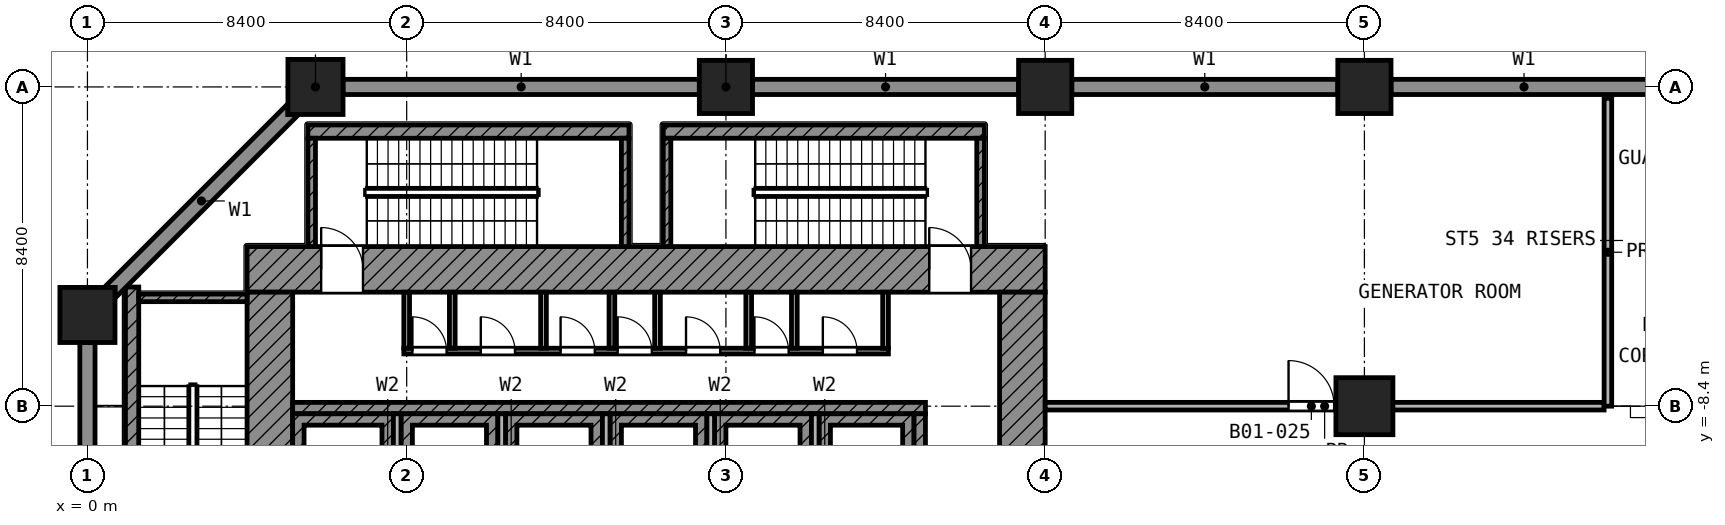
"""IFC4 building model, lengths in metres.
Left out: names, types, materials, properties, quantities, classifications, styles, units other than length and angle.
Written with IfcOpenShell. Run it as: python <this file> out.ifc"""

import sys

from ifc_helpers import new_model, si_unit, direction, frame, frame_2d, origin, origin_2d, place, context, subcontext, project, spatial, polyline, rectangle, outline, extrude, element, fill, save


model = new_model("IFC4")
c1 = context("Model", 3, precision=1e-05, world=origin(), true_north=direction((0.0, 1.0)))
c2 = subcontext(c1, "Body", "Model", "MODEL_VIEW")
j1 = project(units=[si_unit("LENGTHUNIT", "METRE"), si_unit("PLANEANGLEUNIT", "RADIAN")], contexts=[c1])
p1 = place(None, origin())
s1 = spatial("IfcSite", under=j1, at=p1, CompositionType="ELEMENT")
p2 = place(p1, origin())
s2 = spatial("IfcBuilding", under=s1, at=p2, CompositionType="ELEMENT")
p3 = place(p2, frame((0.0, 0.0, -6.0)))
s3 = spatial("IfcBuildingStorey", under=s2, at=p3, CompositionType="ELEMENT", Elevation=-6.0)
p4 = place(p3, origin())
e1 = element("IfcWall", 1, at=p4, inside=s3, PredefinedType="SOLIDWALL", context=c2, shape_type="SweptSolid", body=[
    extrude(outline(polyline([(16.1, -0.2), (6.725, -0.2), (6.725, 0.2), (16.1, 0.2), (16.1, -0.2)])), origin(), (0.0, 0.0, 1.0), 5.55),
])
e2 = element("IfcWall", 2, at=p4, inside=s3, PredefinedType="SOLIDWALL", context=c2, shape_type="SweptSolid", body=[
    extrude(outline(polyline([(24.5, -0.2), (17.5, -0.2), (17.5, 0.2), (24.5, 0.2), (24.5, -0.2)])), origin(), (0.0, 0.0, 1.0), 5.55),
])
e3 = element("IfcWall", 3, at=p4, inside=s3, PredefinedType="SOLIDWALL", context=c2, shape_type="SweptSolid", body=[
    extrude(outline(polyline([(32.9, -0.2), (25.9, -0.2), (25.9, 0.2), (32.9, 0.2), (32.9, -0.2)])), origin(), (0.0, 0.0, 1.0), 5.55),
])
e4 = element("IfcWall", 4, at=p4, inside=s3, PredefinedType="SOLIDWALL", context=c2, shape_type="SweptSolid", body=[
    extrude(outline(polyline([(41.3, -0.2), (34.3, -0.2), (34.3, 0.2), (41.3, 0.2), (41.3, -0.2)])), origin(), (0.0, 0.0, 1.0), 5.55),
])
e5 = element("IfcWall", 5, at=p4, inside=s3, PredefinedType="SOLIDWALL", context=c2, shape_type="SweptSolid", body=[
    extrude(outline(polyline([(5.275, -0.725), (5.558, -0.725), (0.725, -5.558), (0.725, -5.275), (0.442, -5.275), (5.275, -0.442), (5.275, -0.725)])), origin(), (0.0, 0.0, 1.0), 5.55),
])
e6 = element("IfcWall", 6, at=p4, inside=s3, PredefinedType="SOLIDWALL", context=c2, shape_type="SweptSolid", body=[
    extrude(outline(polyline([(0.2, -6.725), (0.2, -16.1), (-0.2, -16.1), (-0.2, -6.725), (0.2, -6.725)])), origin(), (0.0, 0.0, 1.0), 5.55),
])
e7 = element("IfcWall", 7, at=p4, inside=s3, PredefinedType="SHEAR", context=c2, shape_type="SweptSolid", body=[
    extrude(outline(polyline([(5.4, -10.95), (5.4, -8.6), (8.05, -8.6), (8.05, -10.95), (5.4, -10.95)]), holes=[polyline([(7.75, -8.9), (5.7, -8.9), (5.7, -10.65), (7.75, -10.65), (7.75, -8.9)])]), origin(), (0.0, 0.0, 1.0), 4.2),
])
e8 = element("IfcWall", 8, at=p4, inside=s3, PredefinedType="SHEAR", context=c2, shape_type="SweptSolid", body=[
    extrude(outline(polyline([(8.25, -10.95), (8.25, -8.6), (10.8, -8.6), (10.8, -10.95), (8.25, -10.95)]), holes=[polyline([(10.5, -8.9), (8.55, -8.9), (8.55, -10.65), (10.5, -10.65), (10.5, -8.9)])]), origin(), (0.0, 0.0, 1.0), 4.2),
])
e9 = element("IfcWall", 9, at=p4, inside=s3, PredefinedType="SHEAR", context=c2, shape_type="SweptSolid", body=[
    extrude(outline(polyline([(11.0, -10.95), (11.0, -8.6), (13.55, -8.6), (13.55, -10.95), (11.0, -10.95)]), holes=[polyline([(13.25, -8.9), (11.3, -8.9), (11.3, -10.65), (13.25, -10.65), (13.25, -8.9)])]), origin(), (0.0, 0.0, 1.0), 4.2),
])
e10 = element("IfcWall", 10, at=p4, inside=s3, PredefinedType="SHEAR", context=c2, shape_type="SweptSolid", body=[
    extrude(outline(polyline([(13.75, -10.95), (13.75, -8.6), (16.3, -8.6), (16.3, -10.95), (13.75, -10.95)]), holes=[polyline([(16.0, -8.9), (14.05, -8.9), (14.05, -10.65), (16.0, -10.65), (16.0, -8.9)])]), origin(), (0.0, 0.0, 1.0), 4.2),
])
e11 = element("IfcWall", 11, at=p4, inside=s3, PredefinedType="SHEAR", context=c2, shape_type="SweptSolid", body=[
    extrude(outline(polyline([(16.5, -10.95), (16.5, -8.6), (19.05, -8.6), (19.05, -10.95), (16.5, -10.95)]), holes=[polyline([(18.75, -8.9), (16.8, -8.9), (16.8, -10.65), (18.75, -10.65), (18.75, -8.9)])]), origin(), (0.0, 0.0, 1.0), 4.2),
])
e12 = element("IfcWall", 12, at=p4, inside=s3, PredefinedType="SHEAR", context=c2, shape_type="SweptSolid", body=[
    extrude(outline(polyline([(19.25, -10.95), (19.25, -8.6), (21.75, -8.6), (21.75, -10.95), (19.25, -10.95)]), holes=[polyline([(21.45, -8.9), (19.55, -8.9), (19.55, -10.65), (21.45, -10.65), (21.45, -8.9)])]), origin(), (0.0, 0.0, 1.0), 4.2),
])
p5 = place(p3, frame((6.0, 0.0, 0.0), z_axis=(0.0, 0.0, 1.0), x_axis=(1.0, 0.0, 0.0)))
e13 = element("IfcColumn", 13, at=p5, inside=s3, PredefinedType="COLUMN", context=c2, shape_type="SweptSolid", body=[
    extrude(rectangle(XDim=1.45, YDim=1.45, at=origin_2d()), origin(), (0.0, 0.0, 1.0), 6.0),
])
for number, where, z_axis, x_axis in (
    (14, (16.8, 0.0, 0.0), (0.0, 0.0, 1.0), (1.0, 0.0, 0.0)),
    (15, (25.2, 0.0, 0.0), (0.0, 0.0, 1.0), (1.0, 0.0, 0.0)),
    (16, (33.6, 0.0, 0.0), (0.0, 0.0, 1.0), (1.0, 0.0, 0.0)),
):
    element("IfcColumn", number, at=place(p3, frame(where, z_axis=z_axis, x_axis=x_axis)), inside=s3, PredefinedType="COLUMN", context=c2, shape_type="SweptSolid", body=[
        extrude(rectangle(XDim=1.4, YDim=1.4, at=origin_2d()), origin(), (0.0, 0.0, 1.0), 6.0),
    ])
p6 = place(p3, frame((0.0, -6.0, 0.0), z_axis=(0.0, 0.0, 1.0), x_axis=(1.0, 0.0, 0.0)))
e17 = element("IfcColumn", 17, at=p6, inside=s3, PredefinedType="COLUMN", context=c2, shape_type="SweptSolid", body=[
    extrude(rectangle(XDim=1.45, YDim=1.45, at=origin_2d()), origin(), (0.0, 0.0, 1.0), 6.0),
])
p7 = place(p3, frame((33.6, -8.4, 0.0), z_axis=(0.0, 0.0, 1.0), x_axis=(1.0, 0.0, 0.0)))
e18 = element("IfcColumn", 18, at=p7, inside=s3, PredefinedType="COLUMN", context=c2, shape_type="SweptSolid", body=[
    extrude(rectangle(XDim=1.5, YDim=1.5, at=origin_2d()), origin(), (0.0, 0.0, 1.0), 6.0),
])
p8 = place(p3, frame((4.2, -4.8, 0.0), z_axis=(0.0, 0.0, 1.0), x_axis=(1.0, 0.0, 0.0)))
e19 = element("IfcWall", 19, at=p8, inside=s3, PredefinedType="SHEAR", context=c2, shape_type="SweptSolid", body=[
    extrude(rectangle(XDim=21.0, YDim=1.2, at=frame_2d((10.5, 0.0))), origin(), (0.0, 0.0, 1.0), 5.55),
])
p9 = place(p8, frame((1.95, 0.0, 0.0)))
e20 = element("IfcOpeningElement", 20, at=p9, cuts=e19, PredefinedType="OPENING", context=c2, shape_type="SweptSolid", body=[
    extrude(rectangle(XDim=1.1, YDim=2.1, at=frame_2d((0.55, 1.05))), frame((0.0, 0.61, 0.0), z_axis=(0.0, -1.0, 0.0), x_axis=(1.0, 0.0, 0.0)), (0.0, 0.0, 1.0), 1.22),
])
p10 = place(p8, frame((17.95, 0.0, 0.0)))
e21 = element("IfcOpeningElement", 21, at=p10, cuts=e19, PredefinedType="OPENING", context=c2, shape_type="SweptSolid", body=[
    extrude(rectangle(XDim=1.1, YDim=2.1, at=frame_2d((0.55, 1.05))), frame((0.0, 0.61, 0.0), z_axis=(0.0, -1.0, 0.0), x_axis=(1.0, 0.0, 0.0)), (0.0, 0.0, 1.0), 1.22),
])
p11 = place(p3, frame((4.8, -25.2, 0.0), z_axis=(0.0, 0.0, 1.0), x_axis=(0.0, 1.0, 0.0)))
e22 = element("IfcWall", 22, at=p11, inside=s3, PredefinedType="SHEAR", context=c2, shape_type="SweptSolid", body=[
    extrude(rectangle(XDim=19.8, YDim=1.2, at=frame_2d((9.9, 0.0))), origin(), (0.0, 0.0, 1.0), 5.55),
])
p12 = place(p11, frame((11.65, 0.0, 0.0)))
e23 = element("IfcOpeningElement", 23, at=p12, cuts=e22, PredefinedType="OPENING", context=c2, shape_type="SweptSolid", body=[
    extrude(rectangle(XDim=1.1, YDim=2.1, at=frame_2d((0.55, 1.05))), frame((0.0, 0.61, 0.0), z_axis=(0.0, -1.0, 0.0), x_axis=(1.0, 0.0, 0.0)), (0.0, 0.0, 1.0), 1.22),
])
p13 = place(p11, frame((2.35, 0.0, 0.0)))
e24 = element("IfcOpeningElement", 24, at=p13, cuts=e22, PredefinedType="OPENING", context=c2, shape_type="SweptSolid", body=[
    extrude(rectangle(XDim=1.1, YDim=2.1, at=frame_2d((0.55, 1.05))), frame((0.0, 0.61, 0.0), z_axis=(0.0, -1.0, 0.0), x_axis=(1.0, 0.0, 0.0)), (0.0, 0.0, 1.0), 1.22),
])
p14 = place(p3, frame((24.6, -24.0, 0.0), z_axis=(0.0, 0.0, 1.0), x_axis=(0.0, 1.0, 0.0)))
e25 = element("IfcWall", 25, at=p14, inside=s3, PredefinedType="SHEAR", context=c2, shape_type="SweptSolid", body=[
    extrude(rectangle(XDim=18.6, YDim=1.2, at=frame_2d((9.3, 0.0))), origin(), (0.0, 0.0, 1.0), 5.55),
])
p15 = place(p14, frame((10.5, 0.0, 0.0)))
e26 = element("IfcOpeningElement", 26, at=p15, cuts=e25, PredefinedType="OPENING", context=c2, shape_type="SweptSolid", body=[
    extrude(rectangle(XDim=1.8, YDim=2.1, at=frame_2d((0.9, 1.05))), frame((0.0, 0.61, 0.0), z_axis=(0.0, -1.0, 0.0), x_axis=(1.0, 0.0, 0.0)), (0.0, 0.0, 1.0), 1.22),
])
p16 = place(p3, frame((5.4, -8.45, 0.0), z_axis=(0.0, 0.0, 1.0), x_axis=(1.0, 0.0, 0.0)))
e27 = element("IfcWall", 27, at=p16, inside=s3, PredefinedType="SHEAR", context=c2, shape_type="SweptSolid", body=[
    extrude(rectangle(XDim=16.65, YDim=0.3, at=frame_2d((8.325, 0.0))), origin(), (0.0, 0.0, 1.0), 5.55),
])
p17 = place(p3, frame((21.9, -10.95, 0.0), z_axis=(0.0, 0.0, 1.0), x_axis=(0.0, 1.0, 0.0)))
e28 = element("IfcWall", 28, at=p17, inside=s3, PredefinedType="SHEAR", context=c2, shape_type="SweptSolid", body=[
    extrude(rectangle(XDim=2.35, YDim=0.3, at=frame_2d((1.175, 0.0))), origin(), (0.0, 0.0, 1.0), 5.55),
])
for number, where, z_axis, x_axis in (
    (29, (8.15, -10.95, 0.0), (0.0, 0.0, 1.0), (0.0, 1.0, 0.0)),
    (30, (10.9, -10.95, 0.0), (0.0, 0.0, 1.0), (0.0, 1.0, 0.0)),
    (31, (13.65, -10.95, 0.0), (0.0, 0.0, 1.0), (0.0, 1.0, 0.0)),
    (32, (16.4, -10.95, 0.0), (0.0, 0.0, 1.0), (0.0, 1.0, 0.0)),
    (33, (19.15, -10.95, 0.0), (0.0, 0.0, 1.0), (0.0, 1.0, 0.0)),
):
    element("IfcWall", number, at=place(p3, frame(where, z_axis=z_axis, x_axis=x_axis)), inside=s3, PredefinedType="PARTITIONING", context=c2, shape_type="SweptSolid", body=[
        extrude(rectangle(XDim=2.35, YDim=0.2, at=frame_2d((1.175, 0.0))), origin(), (0.0, 0.0, 1.0), 5.55),
    ])
p18 = place(p3, frame((8.325, -6.95, 0.0), z_axis=(0.0, 0.0, 1.0), x_axis=(1.0, 0.0, 0.0)))
e34 = element("IfcWall", 34, at=p18, inside=s3, PredefinedType="PARTITIONING", context=c2, shape_type="SweptSolid", body=[
    extrude(rectangle(XDim=12.75, YDim=0.15, at=frame_2d((6.375, 0.0))), origin(), (0.0, 0.0, 1.0), 5.55),
])
p19 = place(p18, frame((0.225, 0.0, 0.0)))
e35 = element("IfcOpeningElement", 35, at=p19, cuts=e34, PredefinedType="OPENING", context=c2, shape_type="SweptSolid", body=[
    extrude(rectangle(XDim=0.9, YDim=2.1, at=frame_2d((0.45, 1.05))), frame((0.0, 0.085, 0.0), z_axis=(0.0, -1.0, 0.0), x_axis=(1.0, 0.0, 0.0)), (0.0, 0.0, 1.0), 0.17),
])
p20 = place(p18, frame((2.025, 0.0, 0.0)))
e36 = element("IfcOpeningElement", 36, at=p20, cuts=e34, PredefinedType="OPENING", context=c2, shape_type="SweptSolid", body=[
    extrude(rectangle(XDim=0.9, YDim=2.1, at=frame_2d((0.45, 1.05))), frame((0.0, 0.085, 0.0), z_axis=(0.0, -1.0, 0.0), x_axis=(1.0, 0.0, 0.0)), (0.0, 0.0, 1.0), 0.17),
])
p21 = place(p18, frame((4.125, 0.0, 0.0)))
e37 = element("IfcOpeningElement", 37, at=p21, cuts=e34, PredefinedType="OPENING", context=c2, shape_type="SweptSolid", body=[
    extrude(rectangle(XDim=0.9, YDim=2.1, at=frame_2d((0.45, 1.05))), frame((0.0, 0.085, 0.0), z_axis=(0.0, -1.0, 0.0), x_axis=(1.0, 0.0, 0.0)), (0.0, 0.0, 1.0), 0.17),
])
p22 = place(p18, frame((5.625, 0.0, 0.0)))
e38 = element("IfcOpeningElement", 38, at=p22, cuts=e34, PredefinedType="OPENING", context=c2, shape_type="SweptSolid", body=[
    extrude(rectangle(XDim=0.9, YDim=2.1, at=frame_2d((0.45, 1.05))), frame((0.0, 0.085, 0.0), z_axis=(0.0, -1.0, 0.0), x_axis=(1.0, 0.0, 0.0)), (0.0, 0.0, 1.0), 0.17),
])
p23 = place(p18, frame((7.425, 0.0, 0.0)))
e39 = element("IfcOpeningElement", 39, at=p23, cuts=e34, PredefinedType="OPENING", context=c2, shape_type="SweptSolid", body=[
    extrude(rectangle(XDim=0.9, YDim=2.1, at=frame_2d((0.45, 1.05))), frame((0.0, 0.085, 0.0), z_axis=(0.0, -1.0, 0.0), x_axis=(1.0, 0.0, 0.0)), (0.0, 0.0, 1.0), 0.17),
])
p24 = place(p18, frame((9.225, 0.0, 0.0)))
e40 = element("IfcOpeningElement", 40, at=p24, cuts=e34, PredefinedType="OPENING", context=c2, shape_type="SweptSolid", body=[
    extrude(rectangle(XDim=0.9, YDim=2.1, at=frame_2d((0.45, 1.05))), frame((0.0, 0.085, 0.0), z_axis=(0.0, -1.0, 0.0), x_axis=(1.0, 0.0, 0.0)), (0.0, 0.0, 1.0), 0.17),
])
p25 = place(p18, frame((11.025, 0.0, 0.0)))
e41 = element("IfcOpeningElement", 41, at=p25, cuts=e34, PredefinedType="OPENING", context=c2, shape_type="SweptSolid", body=[
    extrude(rectangle(XDim=0.9, YDim=2.1, at=frame_2d((0.45, 1.05))), frame((0.0, 0.085, 0.0), z_axis=(0.0, -1.0, 0.0), x_axis=(1.0, 0.0, 0.0)), (0.0, 0.0, 1.0), 0.17),
])
for number, where, z_axis, x_axis in (
    (42, (8.4, -6.875, 0.0), (0.0, 0.0, 1.0), (0.0, 1.0, 0.0)),
    (43, (9.6, -6.875, 0.0), (0.0, 0.0, 1.0), (0.0, 1.0, 0.0)),
    (44, (12.0, -6.875, 0.0), (0.0, 0.0, 1.0), (0.0, 1.0, 0.0)),
    (45, (13.8, -6.875, 0.0), (0.0, 0.0, 1.0), (0.0, 1.0, 0.0)),
    (46, (15.0, -6.875, 0.0), (0.0, 0.0, 1.0), (0.0, 1.0, 0.0)),
    (47, (17.4, -6.875, 0.0), (0.0, 0.0, 1.0), (0.0, 1.0, 0.0)),
    (48, (18.6, -6.875, 0.0), (0.0, 0.0, 1.0), (0.0, 1.0, 0.0)),
    (49, (21.0, -6.875, 0.0), (0.0, 0.0, 1.0), (0.0, 1.0, 0.0)),
):
    element("IfcWall", number, at=place(p3, frame(where, z_axis=z_axis, x_axis=x_axis)), inside=s3, PredefinedType="PARTITIONING", context=c2, shape_type="SweptSolid", body=[
        extrude(rectangle(XDim=1.475, YDim=0.15, at=frame_2d((0.738, 0.0))), origin(), (0.0, 0.0, 1.0), 5.55),
    ])
p26 = place(p3, frame((1.175, -13.9, 0.0), z_axis=(0.0, 0.0, 1.0), x_axis=(0.0, 1.0, 0.0)))
e50 = element("IfcWall", 50, at=p26, inside=s3, PredefinedType="SHEAR", context=c2, shape_type="SweptSolid", body=[
    extrude(rectangle(XDim=8.635, YDim=0.35, at=frame_2d((4.317, 0.0))), origin(), (0.0, 0.0, 1.0), 5.55),
])
p27 = place(p3, frame((1.35, -5.55, 0.0), z_axis=(0.0, 0.0, 1.0), x_axis=(1.0, 0.0, 0.0)))
e51 = element("IfcWall", 51, at=p27, inside=s3, PredefinedType="SHEAR", context=c2, shape_type="SweptSolid", body=[
    extrude(rectangle(XDim=2.85, YDim=0.2, at=frame_2d((1.425, 0.0))), origin(), (0.0, 0.0, 1.0), 5.55),
])
p28 = place(p3, frame((5.8, -1.175, 0.0), z_axis=(0.0, 0.0, 1.0), x_axis=(1.0, 0.0, 0.0)))
e52 = element("IfcWall", 52, at=p28, inside=s3, PredefinedType="SHEAR", context=c2, shape_type="SweptSolid", body=[
    extrude(rectangle(XDim=8.45, YDim=0.35, at=frame_2d((4.225, 0.0))), origin(), (0.0, 0.0, 1.0), 5.55),
])
for number, where, z_axis, x_axis in (
    (53, (5.9, -4.2, 0.0), (0.0, 0.0, 1.0), (0.0, 1.0, 0.0)),
    (54, (14.15, -4.2, 0.0), (0.0, 0.0, 1.0), (0.0, 1.0, 0.0)),
):
    element("IfcWall", number, at=place(p3, frame(where, z_axis=z_axis, x_axis=x_axis)), inside=s3, PredefinedType="SHEAR", context=c2, shape_type="SweptSolid", body=[
        extrude(rectangle(XDim=2.85, YDim=0.2, at=frame_2d((1.425, 0.0))), origin(), (0.0, 0.0, 1.0), 5.55),
    ])
p29 = place(p3, frame((15.15, -1.175, 0.0), z_axis=(0.0, 0.0, 1.0), x_axis=(1.0, 0.0, 0.0)))
e55 = element("IfcWall", 55, at=p29, inside=s3, PredefinedType="SHEAR", context=c2, shape_type="SweptSolid", body=[
    extrude(rectangle(XDim=8.45, YDim=0.35, at=frame_2d((4.225, 0.0))), origin(), (0.0, 0.0, 1.0), 5.55),
])
for number, where, z_axis, x_axis in (
    (56, (15.25, -4.2, 0.0), (0.0, 0.0, 1.0), (0.0, 1.0, 0.0)),
    (57, (23.5, -4.2, 0.0), (0.0, 0.0, 1.0), (0.0, 1.0, 0.0)),
):
    element("IfcWall", number, at=place(p3, frame(where, z_axis=z_axis, x_axis=x_axis)), inside=s3, PredefinedType="SHEAR", context=c2, shape_type="SweptSolid", body=[
        extrude(rectangle(XDim=2.85, YDim=0.2, at=frame_2d((1.425, 0.0))), origin(), (0.0, 0.0, 1.0), 5.55),
    ])
p30 = place(p3, frame((25.2, -8.4, 0.0), z_axis=(0.0, 0.0, 1.0), x_axis=(1.0, 0.0, 0.0)))
e58 = element("IfcWall", 58, at=p30, inside=s3, PredefinedType="PARTITIONING", context=c2, shape_type="SweptSolid", body=[
    extrude(rectangle(XDim=14.707, YDim=0.2, at=frame_2d((7.354, 0.0))), origin(), (0.0, 0.0, 1.0), 5.55),
])
p31 = place(p30, frame((6.404, 0.0, 0.0)))
e59 = element("IfcOpeningElement", 59, at=p31, cuts=e58, PredefinedType="OPENING", context=c2, shape_type="SweptSolid", body=[
    extrude(rectangle(XDim=1.2, YDim=2.1, at=frame_2d((0.6, 1.05))), frame((0.0, 0.11, 0.0), z_axis=(0.0, -1.0, 0.0), x_axis=(1.0, 0.0, 0.0)), (0.0, 0.0, 1.0), 0.22),
])
p32 = place(p3, frame((40.007, -8.4, 0.0), z_axis=(0.0, 0.0, 1.0), x_axis=(0.0, 1.0, 0.0)))
e60 = element("IfcWall", 60, at=p32, inside=s3, PredefinedType="PARTITIONING", context=c2, shape_type="SweptSolid", body=[
    extrude(rectangle(XDim=8.101, YDim=0.2, at=frame_2d((4.05, 0.0))), origin(), (0.0, 0.0, 1.0), 5.55),
])
p33 = place(p9, origin())
e61 = element("IfcDoor", 61, at=p33, inside=s3, OperationType="SINGLE_SWING_LEFT", PredefinedType="DOOR", context=c2, shape_type="SweptSolid", body=[
    extrude(rectangle(XDim=1.1, YDim=2.1, at=frame_2d((0.55, 1.05))), frame((0.0, 0.025, 0.0), z_axis=(0.0, -1.0, 0.0), x_axis=(1.0, 0.0, 0.0)), (0.0, 0.0, 1.0), 0.05),
])
fill(e20, e61)
p34 = place(p10, origin())
e62 = element("IfcDoor", 62, at=p34, inside=s3, OperationType="SINGLE_SWING_LEFT", PredefinedType="DOOR", context=c2, shape_type="SweptSolid", body=[
    extrude(rectangle(XDim=1.1, YDim=2.1, at=frame_2d((0.55, 1.05))), frame((0.0, 0.025, 0.0), z_axis=(0.0, -1.0, 0.0), x_axis=(1.0, 0.0, 0.0)), (0.0, 0.0, 1.0), 0.05),
])
fill(e21, e62)
p35 = place(p19, origin())
e63 = element("IfcDoor", 63, at=p35, inside=s3, OperationType="SINGLE_SWING_LEFT", PredefinedType="DOOR", context=c2, shape_type="SweptSolid", body=[
    extrude(rectangle(XDim=0.9, YDim=2.1, at=frame_2d((0.45, 1.05))), frame((0.0, 0.025, 0.0), z_axis=(0.0, -1.0, 0.0), x_axis=(1.0, 0.0, 0.0)), (0.0, 0.0, 1.0), 0.05),
])
fill(e35, e63)
p36 = place(p20, origin())
e64 = element("IfcDoor", 64, at=p36, inside=s3, OperationType="SINGLE_SWING_LEFT", PredefinedType="DOOR", context=c2, shape_type="SweptSolid", body=[
    extrude(rectangle(XDim=0.9, YDim=2.1, at=frame_2d((0.45, 1.05))), frame((0.0, 0.025, 0.0), z_axis=(0.0, -1.0, 0.0), x_axis=(1.0, 0.0, 0.0)), (0.0, 0.0, 1.0), 0.05),
])
fill(e36, e64)
p37 = place(p21, origin())
e65 = element("IfcDoor", 65, at=p37, inside=s3, OperationType="SINGLE_SWING_LEFT", PredefinedType="DOOR", context=c2, shape_type="SweptSolid", body=[
    extrude(rectangle(XDim=0.9, YDim=2.1, at=frame_2d((0.45, 1.05))), frame((0.0, 0.025, 0.0), z_axis=(0.0, -1.0, 0.0), x_axis=(1.0, 0.0, 0.0)), (0.0, 0.0, 1.0), 0.05),
])
fill(e37, e65)
p38 = place(p22, origin())
e66 = element("IfcDoor", 66, at=p38, inside=s3, OperationType="SINGLE_SWING_LEFT", PredefinedType="DOOR", context=c2, shape_type="SweptSolid", body=[
    extrude(rectangle(XDim=0.9, YDim=2.1, at=frame_2d((0.45, 1.05))), frame((0.0, 0.025, 0.0), z_axis=(0.0, -1.0, 0.0), x_axis=(1.0, 0.0, 0.0)), (0.0, 0.0, 1.0), 0.05),
])
fill(e38, e66)
p39 = place(p23, origin())
e67 = element("IfcDoor", 67, at=p39, inside=s3, OperationType="SINGLE_SWING_LEFT", PredefinedType="DOOR", context=c2, shape_type="SweptSolid", body=[
    extrude(rectangle(XDim=0.9, YDim=2.1, at=frame_2d((0.45, 1.05))), frame((0.0, 0.025, 0.0), z_axis=(0.0, -1.0, 0.0), x_axis=(1.0, 0.0, 0.0)), (0.0, 0.0, 1.0), 0.05),
])
fill(e39, e67)
p40 = place(p24, origin())
e68 = element("IfcDoor", 68, at=p40, inside=s3, OperationType="SINGLE_SWING_LEFT", PredefinedType="DOOR", context=c2, shape_type="SweptSolid", body=[
    extrude(rectangle(XDim=0.9, YDim=2.1, at=frame_2d((0.45, 1.05))), frame((0.0, 0.025, 0.0), z_axis=(0.0, -1.0, 0.0), x_axis=(1.0, 0.0, 0.0)), (0.0, 0.0, 1.0), 0.05),
])
fill(e40, e68)
p41 = place(p25, origin())
e69 = element("IfcDoor", 69, at=p41, inside=s3, OperationType="SINGLE_SWING_LEFT", PredefinedType="DOOR", context=c2, shape_type="SweptSolid", body=[
    extrude(rectangle(XDim=0.9, YDim=2.1, at=frame_2d((0.45, 1.05))), frame((0.0, 0.025, 0.0), z_axis=(0.0, -1.0, 0.0), x_axis=(1.0, 0.0, 0.0)), (0.0, 0.0, 1.0), 0.05),
])
fill(e41, e69)
p42 = place(p31, origin())
e70 = element("IfcDoor", 70, at=p42, inside=s3, OperationType="SINGLE_SWING_LEFT", PredefinedType="DOOR", context=c2, shape_type="SweptSolid", body=[
    extrude(rectangle(XDim=1.2, YDim=2.1, at=frame_2d((0.6, 1.05))), frame((0.0, 0.025, 0.0), z_axis=(0.0, -1.0, 0.0), x_axis=(1.0, 0.0, 0.0)), (0.0, 0.0, 1.0), 0.05),
])
fill(e59, e70)
save(model, sys.argv[1])
